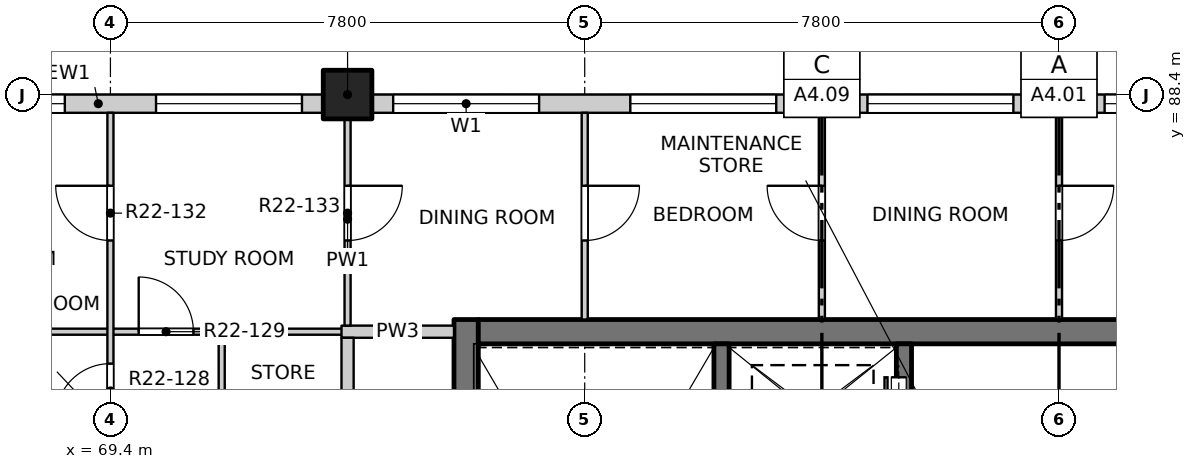
"""IFC4 building model, lengths in metres.
Left out: names, types, materials, properties, quantities, classifications, styles, units other than length and angle.
Written with IfcOpenShell. Run it as: python <this file> out.ifc"""

import sys

from ifc_helpers import new_model, si_unit, direction, frame, frame_2d, origin, origin_2d, place, context, subcontext, project, spatial, rectangle, extrude, element, fill, save


model = new_model("IFC4")
c1 = context("Model", 3, precision=1e-05, world=origin(), true_north=direction((0.0, 1.0)))
c2 = subcontext(c1, "Body", "Model", "MODEL_VIEW")
j1 = project(units=[si_unit("LENGTHUNIT", "METRE"), si_unit("PLANEANGLEUNIT", "RADIAN")], contexts=[c1])
p1 = place(None, origin())
s1 = spatial("IfcSite", under=j1, at=p1, CompositionType="ELEMENT")
p2 = place(p1, origin())
s2 = spatial("IfcBuilding", under=s1, at=p2, CompositionType="ELEMENT")
p3 = place(p2, frame((0.0, 0.0, 231.3)))
s3 = spatial("IfcBuildingStorey", under=s2, at=p3, CompositionType="ELEMENT", Elevation=231.3)
p4 = place(p3, frame((73.3, 88.4, -0.25), z_axis=(0.0, 0.0, 1.0), x_axis=(1.0, 0.0, 0.0)))
e1 = element("IfcColumn", 1, at=p4, inside=s3, PredefinedType="COLUMN", context=c2, shape_type="SweptSolid", body=[
    extrude(rectangle(XDim=0.8, YDim=0.8, at=origin_2d()), origin(), (0.0, 0.0, 1.0), 3.4),
])
p5 = place(p3, frame((75.25, 77.3, -0.25), z_axis=(0.0, 0.0, 1.0), x_axis=(0.0, 1.0, 0.0)))
e2 = element("IfcWall", 2, at=p5, inside=s3, PredefinedType="SOLIDWALL", context=c2, shape_type="SweptSolid", body=[
    extrude(rectangle(XDim=7.4, YDim=0.4, at=frame_2d((3.7, 0.0))), origin(), (0.0, 0.0, 1.0), 3.4),
])
p6 = place(p5, frame((0.3, 0.0, 0.25)))
e3 = element("IfcOpeningElement", 3, at=p6, cuts=e2, PredefinedType="OPENING", context=c2, shape_type="SweptSolid", body=[
    extrude(rectangle(XDim=1.2, YDim=2.1, at=frame_2d((0.6, 1.05))), frame((0.0, 0.21, 0.0), z_axis=(0.0, -1.0, 0.0), x_axis=(1.0, 0.0, 0.0)), (0.0, 0.0, 1.0), 0.42),
])
p7 = place(p3, frame((75.45, 84.5, -0.25), z_axis=(0.0, 0.0, 1.0), x_axis=(1.0, 0.0, 0.0)))
e4 = element("IfcWall", 4, at=p7, inside=s3, PredefinedType="SOLIDWALL", context=c2, shape_type="SweptSolid", body=[
    extrude(rectangle(XDim=19.1, YDim=0.4, at=frame_2d((9.55, 0.0))), origin(), (0.0, 0.0, 1.0), 3.4),
])
p8 = place(p3, frame((79.45, 77.3, -0.25), z_axis=(0.0, 0.0, 1.0), x_axis=(0.0, 1.0, 0.0)))
e5 = element("IfcWall", 5, at=p8, inside=s3, PredefinedType="SOLIDWALL", context=c2, shape_type="SweptSolid", body=[
    extrude(rectangle(XDim=7.0, YDim=0.25, at=frame_2d((3.5, 0.0))), origin(), (0.0, 0.0, 1.0), 3.4),
])
p9 = place(p3, frame((82.45, 82.025, -0.25), z_axis=(0.0, 0.0, 1.0), x_axis=(0.0, 1.0, 0.0)))
e6 = element("IfcWall", 6, at=p9, inside=s3, PredefinedType="SOLIDWALL", context=c2, shape_type="SweptSolid", body=[
    extrude(rectangle(XDim=2.275, YDim=0.25, at=frame_2d((1.138, 0.0))), origin(), (0.0, 0.0, 1.0), 3.4),
])
p10 = place(p9, frame((0.625, 0.0, 0.25)))
e7 = element("IfcOpeningElement", 7, at=p10, cuts=e6, PredefinedType="OPENING", context=c2, shape_type="SweptSolid", body=[
    extrude(rectangle(XDim=1.1, YDim=2.1, at=frame_2d((0.55, 1.05))), frame((0.0, 0.135, 0.0), z_axis=(0.0, -1.0, 0.0), x_axis=(1.0, 0.0, 0.0)), (0.0, 0.0, 1.0), 0.27),
])
p11 = place(p3, frame((65.5, 88.25, 0.0), z_axis=(0.0, 0.0, 1.0), x_axis=(1.0, 0.0, 0.0)))
e8 = element("IfcWall", 8, at=p11, inside=s3, PredefinedType="SOLIDWALL", context=c2, shape_type="SweptSolid", body=[
    extrude(rectangle(XDim=7.4, YDim=0.3, at=frame_2d((3.7, 0.0))), origin(), (0.0, 0.0, 1.0), 2.7),
])
p12 = place(p11, frame((0.75, 0.0, 0.9)))
e9 = element("IfcOpeningElement", 9, at=p12, cuts=e8, PredefinedType="OPENING", context=c2, shape_type="SweptSolid", body=[
    extrude(rectangle(XDim=2.4, YDim=1.8, at=frame_2d((1.2, 0.9))), frame((0.0, 0.16, 0.0), z_axis=(0.0, -1.0, 0.0), x_axis=(1.0, 0.0, 0.0)), (0.0, 0.0, 1.0), 0.32),
])
p13 = place(p11, frame((4.65, 0.0, 0.9)))
e10 = element("IfcOpeningElement", 10, at=p13, cuts=e8, PredefinedType="OPENING", context=c2, shape_type="SweptSolid", body=[
    extrude(rectangle(XDim=2.4, YDim=1.8, at=frame_2d((1.2, 0.9))), frame((0.0, 0.16, 0.0), z_axis=(0.0, -1.0, 0.0), x_axis=(1.0, 0.0, 0.0)), (0.0, 0.0, 1.0), 0.32),
])
p14 = place(p3, frame((73.7, 88.25, 0.0), z_axis=(0.0, 0.0, 1.0), x_axis=(1.0, 0.0, 0.0)))
e11 = element("IfcWall", 11, at=p14, inside=s3, PredefinedType="SOLIDWALL", context=c2, shape_type="SweptSolid", body=[
    extrude(rectangle(XDim=22.6, YDim=0.3, at=frame_2d((11.3, 0.0))), origin(), (0.0, 0.0, 1.0), 2.7),
])
p15 = place(p14, frame((0.35, 0.0, 0.9)))
e12 = element("IfcOpeningElement", 12, at=p15, cuts=e11, PredefinedType="OPENING", context=c2, shape_type="SweptSolid", body=[
    extrude(rectangle(XDim=2.4, YDim=1.8, at=frame_2d((1.2, 0.9))), frame((0.0, 0.16, 0.0), z_axis=(0.0, -1.0, 0.0), x_axis=(1.0, 0.0, 0.0)), (0.0, 0.0, 1.0), 0.32),
])
p16 = place(p14, frame((4.25, 0.0, 0.9)))
e13 = element("IfcOpeningElement", 13, at=p16, cuts=e11, PredefinedType="OPENING", context=c2, shape_type="SweptSolid", body=[
    extrude(rectangle(XDim=2.4, YDim=1.8, at=frame_2d((1.2, 0.9))), frame((0.0, 0.16, 0.0), z_axis=(0.0, -1.0, 0.0), x_axis=(1.0, 0.0, 0.0)), (0.0, 0.0, 1.0), 0.32),
])
p17 = place(p14, frame((8.15, 0.0, 0.9)))
e14 = element("IfcOpeningElement", 14, at=p17, cuts=e11, PredefinedType="OPENING", context=c2, shape_type="SweptSolid", body=[
    extrude(rectangle(XDim=2.4, YDim=1.8, at=frame_2d((1.2, 0.9))), frame((0.0, 0.16, 0.0), z_axis=(0.0, -1.0, 0.0), x_axis=(1.0, 0.0, 0.0)), (0.0, 0.0, 1.0), 0.32),
])
p18 = place(p14, frame((12.05, 0.0, 0.9)))
e15 = element("IfcOpeningElement", 15, at=p18, cuts=e11, PredefinedType="OPENING", context=c2, shape_type="SweptSolid", body=[
    extrude(rectangle(XDim=2.4, YDim=1.8, at=frame_2d((1.2, 0.9))), frame((0.0, 0.16, 0.0), z_axis=(0.0, -1.0, 0.0), x_axis=(1.0, 0.0, 0.0)), (0.0, 0.0, 1.0), 0.32),
])
p19 = place(p14, frame((15.95, 0.0, 0.9)))
e16 = element("IfcOpeningElement", 16, at=p19, cuts=e11, PredefinedType="OPENING", context=c2, shape_type="SweptSolid", body=[
    extrude(rectangle(XDim=2.4, YDim=1.8, at=frame_2d((1.2, 0.9))), frame((0.0, 0.16, 0.0), z_axis=(0.0, -1.0, 0.0), x_axis=(1.0, 0.0, 0.0)), (0.0, 0.0, 1.0), 0.32),
])
p20 = place(p14, frame((19.85, 0.0, 0.9)))
e17 = element("IfcOpeningElement", 17, at=p20, cuts=e11, PredefinedType="OPENING", context=c2, shape_type="SweptSolid", body=[
    extrude(rectangle(XDim=2.4, YDim=1.8, at=frame_2d((1.2, 0.9))), frame((0.0, 0.16, 0.0), z_axis=(0.0, -1.0, 0.0), x_axis=(1.0, 0.0, 0.0)), (0.0, 0.0, 1.0), 0.32),
])
p21 = place(p3, frame((61.9, 84.5, 0.0), z_axis=(0.0, 0.0, 1.0), x_axis=(1.0, 0.0, 0.0)))
e18 = element("IfcWall", 18, at=p21, inside=s3, PredefinedType="PARTITIONING", context=c2, shape_type="SweptSolid", body=[
    extrude(rectangle(XDim=11.5, YDim=0.1, at=frame_2d((5.75, 0.0))), origin(), (0.0, 0.0, 1.0), 3.15),
])
p22 = place(p21, frame((7.965, 0.0, 0.0)))
e19 = element("IfcOpeningElement", 19, at=p22, cuts=e18, PredefinedType="OPENING", context=c2, shape_type="SweptSolid", body=[
    extrude(rectangle(XDim=0.9, YDim=2.1, at=frame_2d((0.45, 1.05))), frame((0.0, 0.06, 0.0), z_axis=(0.0, -1.0, 0.0), x_axis=(1.0, 0.0, 0.0)), (0.0, 0.0, 1.0), 0.12),
])
p23 = place(p3, frame((73.2, 84.5, 0.0), z_axis=(0.0, 0.0, 1.0), x_axis=(1.0, 0.0, 0.0)))
e20 = element("IfcWall", 20, at=p23, inside=s3, PredefinedType="PARTITIONING", context=c2, shape_type="SweptSolid", body=[
    extrude(rectangle(XDim=1.85, YDim=0.2, at=frame_2d((0.925, 0.0))), origin(), (0.0, 0.0, 1.0), 3.15),
])
p24 = place(p3, frame((69.4, 41.9, 0.0), z_axis=(0.0, 0.0, 1.0), x_axis=(0.0, 1.0, 0.0)))
e21 = element("IfcWall", 21, at=p24, inside=s3, PredefinedType="PARTITIONING", context=c2, shape_type="SweptSolid", body=[
    extrude(rectangle(XDim=46.2, YDim=0.1, at=frame_2d((23.1, 0.0))), origin(), (0.0, 0.0, 1.0), 3.15),
])
p25 = place(p24, frame((1.2, 0.0, 0.0)))
e22 = element("IfcOpeningElement", 22, at=p25, cuts=e21, PredefinedType="OPENING", context=c2, shape_type="SweptSolid", body=[
    extrude(rectangle(XDim=0.9, YDim=2.1, at=frame_2d((0.45, 1.05))), frame((0.0, 0.06, 0.0), z_axis=(0.0, -1.0, 0.0), x_axis=(1.0, 0.0, 0.0)), (0.0, 0.0, 1.0), 0.12),
])
p26 = place(p24, frame((5.1, 0.0, 0.0)))
e23 = element("IfcOpeningElement", 23, at=p26, cuts=e21, PredefinedType="OPENING", context=c2, shape_type="SweptSolid", body=[
    extrude(rectangle(XDim=0.9, YDim=2.1, at=frame_2d((0.45, 1.05))), frame((0.0, 0.06, 0.0), z_axis=(0.0, -1.0, 0.0), x_axis=(1.0, 0.0, 0.0)), (0.0, 0.0, 1.0), 0.12),
])
p27 = place(p24, frame((9.0, 0.0, 0.0)))
e24 = element("IfcOpeningElement", 24, at=p27, cuts=e21, PredefinedType="OPENING", context=c2, shape_type="SweptSolid", body=[
    extrude(rectangle(XDim=0.9, YDim=2.1, at=frame_2d((0.45, 1.05))), frame((0.0, 0.06, 0.0), z_axis=(0.0, -1.0, 0.0), x_axis=(1.0, 0.0, 0.0)), (0.0, 0.0, 1.0), 0.12),
])
p28 = place(p24, frame((13.85, 0.0, 0.0)))
e25 = element("IfcOpeningElement", 25, at=p28, cuts=e21, PredefinedType="OPENING", context=c2, shape_type="SweptSolid", body=[
    extrude(rectangle(XDim=0.9, YDim=2.1, at=frame_2d((0.45, 1.05))), frame((0.0, 0.06, 0.0), z_axis=(0.0, -1.0, 0.0), x_axis=(1.0, 0.0, 0.0)), (0.0, 0.0, 1.0), 0.12),
])
p29 = place(p24, frame((17.775, 0.0, 0.0)))
e26 = element("IfcOpeningElement", 26, at=p29, cuts=e21, PredefinedType="OPENING", context=c2, shape_type="SweptSolid", body=[
    extrude(rectangle(XDim=0.9, YDim=2.1, at=frame_2d((0.45, 1.05))), frame((0.0, 0.06, 0.0), z_axis=(0.0, -1.0, 0.0), x_axis=(1.0, 0.0, 0.0)), (0.0, 0.0, 1.0), 0.12),
])
p30 = place(p24, frame((21.625, 0.0, 0.0)))
e27 = element("IfcOpeningElement", 27, at=p30, cuts=e21, PredefinedType="OPENING", context=c2, shape_type="SweptSolid", body=[
    extrude(rectangle(XDim=0.9, YDim=2.1, at=frame_2d((0.45, 1.05))), frame((0.0, 0.06, 0.0), z_axis=(0.0, -1.0, 0.0), x_axis=(1.0, 0.0, 0.0)), (0.0, 0.0, 1.0), 0.12),
])
p31 = place(p24, frame((24.6, 0.0, 0.0)))
e28 = element("IfcOpeningElement", 28, at=p31, cuts=e21, PredefinedType="OPENING", context=c2, shape_type="SweptSolid", body=[
    extrude(rectangle(XDim=0.9, YDim=2.1, at=frame_2d((0.45, 1.05))), frame((0.0, 0.06, 0.0), z_axis=(0.0, -1.0, 0.0), x_axis=(1.0, 0.0, 0.0)), (0.0, 0.0, 1.0), 0.12),
])
p32 = place(p24, frame((29.425, 0.0, 0.0)))
e29 = element("IfcOpeningElement", 29, at=p32, cuts=e21, PredefinedType="OPENING", context=c2, shape_type="SweptSolid", body=[
    extrude(rectangle(XDim=0.9, YDim=2.1, at=frame_2d((0.45, 1.05))), frame((0.0, 0.06, 0.0), z_axis=(0.0, -1.0, 0.0), x_axis=(1.0, 0.0, 0.0)), (0.0, 0.0, 1.0), 0.12),
])
p33 = place(p24, frame((33.375, 0.0, 0.0)))
e30 = element("IfcOpeningElement", 30, at=p33, cuts=e21, PredefinedType="OPENING", context=c2, shape_type="SweptSolid", body=[
    extrude(rectangle(XDim=0.9, YDim=2.1, at=frame_2d((0.45, 1.05))), frame((0.0, 0.06, 0.0), z_axis=(0.0, -1.0, 0.0), x_axis=(1.0, 0.0, 0.0)), (0.0, 0.0, 1.0), 0.12),
])
p34 = place(p24, frame((36.3, 0.0, 0.0)))
e31 = element("IfcOpeningElement", 31, at=p34, cuts=e21, PredefinedType="OPENING", context=c2, shape_type="SweptSolid", body=[
    extrude(rectangle(XDim=0.9, YDim=2.1, at=frame_2d((0.45, 1.05))), frame((0.0, 0.06, 0.0), z_axis=(0.0, -1.0, 0.0), x_axis=(1.0, 0.0, 0.0)), (0.0, 0.0, 1.0), 0.12),
])
p35 = place(p24, frame((41.175, 0.0, 0.0)))
e32 = element("IfcOpeningElement", 32, at=p35, cuts=e21, PredefinedType="OPENING", context=c2, shape_type="SweptSolid", body=[
    extrude(rectangle(XDim=0.9, YDim=2.1, at=frame_2d((0.45, 1.05))), frame((0.0, 0.06, 0.0), z_axis=(0.0, -1.0, 0.0), x_axis=(1.0, 0.0, 0.0)), (0.0, 0.0, 1.0), 0.12),
])
p36 = place(p24, frame((44.1, 0.0, 0.0)))
e33 = element("IfcOpeningElement", 33, at=p36, cuts=e21, PredefinedType="OPENING", context=c2, shape_type="SweptSolid", body=[
    extrude(rectangle(XDim=0.9, YDim=2.1, at=frame_2d((0.45, 1.05))), frame((0.0, 0.06, 0.0), z_axis=(0.0, -1.0, 0.0), x_axis=(1.0, 0.0, 0.0)), (0.0, 0.0, 1.0), 0.12),
])
p37 = place(p3, frame((71.23, 75.55, 0.0), z_axis=(0.0, 0.0, 1.0), x_axis=(0.0, 1.0, 0.0)))
e34 = element("IfcWall", 34, at=p37, inside=s3, PredefinedType="PARTITIONING", context=c2, shape_type="SweptSolid", body=[
    extrude(rectangle(XDim=8.9, YDim=0.1, at=frame_2d((4.45, 0.0))), origin(), (0.0, 0.0, 1.0), 3.15),
])
p38 = place(p37, frame((0.7, 0.0, 0.0)))
e35 = element("IfcOpeningElement", 35, at=p38, cuts=e34, PredefinedType="OPENING", context=c2, shape_type="SweptSolid", body=[
    extrude(rectangle(XDim=0.9, YDim=2.1, at=frame_2d((0.45, 1.05))), frame((0.0, 0.06, 0.0), z_axis=(0.0, -1.0, 0.0), x_axis=(1.0, 0.0, 0.0)), (0.0, 0.0, 1.0), 0.12),
])
p39 = place(p37, frame((3.75, 0.0, 0.0)))
e36 = element("IfcOpeningElement", 36, at=p39, cuts=e34, PredefinedType="OPENING", context=c2, shape_type="SweptSolid", body=[
    extrude(rectangle(XDim=0.9, YDim=2.1, at=frame_2d((0.45, 1.05))), frame((0.0, 0.06, 0.0), z_axis=(0.0, -1.0, 0.0), x_axis=(1.0, 0.0, 0.0)), (0.0, 0.0, 1.0), 0.12),
])
p40 = place(p37, frame((7.1, 0.0, 0.0)))
e37 = element("IfcOpeningElement", 37, at=p40, cuts=e34, PredefinedType="OPENING", context=c2, shape_type="SweptSolid", body=[
    extrude(rectangle(XDim=0.8, YDim=2.1, at=frame_2d((0.4, 1.05))), frame((0.0, 0.06, 0.0), z_axis=(0.0, -1.0, 0.0), x_axis=(1.0, 0.0, 0.0)), (0.0, 0.0, 1.0), 0.12),
])
p41 = place(p3, frame((73.3, 49.5, 0.0), z_axis=(0.0, 0.0, 1.0), x_axis=(0.0, 1.0, 0.0)))
e38 = element("IfcWall", 38, at=p41, inside=s3, PredefinedType="PARTITIONING", context=c2, shape_type="SweptSolid", body=[
    extrude(rectangle(XDim=34.9, YDim=0.2, at=frame_2d((17.45, 0.0))), origin(), (0.0, 0.0, 1.0), 3.15),
])
p42 = place(p41, frame((3.575, 0.0, 0.0)))
e39 = element("IfcOpeningElement", 39, at=p42, cuts=e38, PredefinedType="OPENING", context=c2, shape_type="SweptSolid", body=[
    extrude(rectangle(XDim=1.0, YDim=2.1, at=frame_2d((0.5, 1.05))), frame((0.0, 0.11, 0.0), z_axis=(0.0, -1.0, 0.0), x_axis=(1.0, 0.0, 0.0)), (0.0, 0.0, 1.0), 0.22),
])
p43 = place(p41, frame((18.075, 0.0, 0.0)))
e40 = element("IfcOpeningElement", 40, at=p43, cuts=e38, PredefinedType="OPENING", context=c2, shape_type="SweptSolid", body=[
    extrude(rectangle(XDim=1.0, YDim=2.1, at=frame_2d((0.5, 1.05))), frame((0.0, 0.11, 0.0), z_axis=(0.0, -1.0, 0.0), x_axis=(1.0, 0.0, 0.0)), (0.0, 0.0, 1.0), 0.22),
])
p44 = place(p41, frame((26.175, 0.0, 0.0)))
e41 = element("IfcOpeningElement", 41, at=p44, cuts=e38, PredefinedType="OPENING", context=c2, shape_type="SweptSolid", body=[
    extrude(rectangle(XDim=1.0, YDim=2.1, at=frame_2d((0.5, 1.05))), frame((0.0, 0.11, 0.0), z_axis=(0.0, -1.0, 0.0), x_axis=(1.0, 0.0, 0.0)), (0.0, 0.0, 1.0), 0.22),
])
p45 = place(p3, frame((73.3, 84.6, 0.0), z_axis=(0.0, 0.0, 1.0), x_axis=(0.0, 1.0, 0.0)))
e42 = element("IfcWall", 42, at=p45, inside=s3, PredefinedType="PARTITIONING", context=c2, shape_type="SweptSolid", body=[
    extrude(rectangle(XDim=3.5, YDim=0.1, at=frame_2d((1.75, 0.0))), origin(), (0.0, 0.0, 1.0), 3.15),
])
p46 = place(p45, frame((1.4, 0.0, 0.0)))
e43 = element("IfcOpeningElement", 43, at=p46, cuts=e42, PredefinedType="OPENING", context=c2, shape_type="SweptSolid", body=[
    extrude(rectangle(XDim=0.9, YDim=2.1, at=frame_2d((0.45, 1.05))), frame((0.0, 0.06, 0.0), z_axis=(0.0, -1.0, 0.0), x_axis=(1.0, 0.0, 0.0)), (0.0, 0.0, 1.0), 0.12),
])
p47 = place(p3, frame((77.2, 84.7, 0.0), z_axis=(0.0, 0.0, 1.0), x_axis=(0.0, 1.0, 0.0)))
e44 = element("IfcWall", 44, at=p47, inside=s3, PredefinedType="PARTITIONING", context=c2, shape_type="SweptSolid", body=[
    extrude(rectangle(XDim=3.4, YDim=0.1, at=frame_2d((1.7, 0.0))), origin(), (0.0, 0.0, 1.0), 3.15),
])
p48 = place(p47, frame((1.3, 0.0, 0.0)))
e45 = element("IfcOpeningElement", 45, at=p48, cuts=e44, PredefinedType="OPENING", context=c2, shape_type="SweptSolid", body=[
    extrude(rectangle(XDim=0.9, YDim=2.1, at=frame_2d((0.45, 1.05))), frame((0.0, 0.06, 0.0), z_axis=(0.0, -1.0, 0.0), x_axis=(1.0, 0.0, 0.0)), (0.0, 0.0, 1.0), 0.12),
])
p49 = place(p3, frame((81.1, 84.7, 0.0), z_axis=(0.0, 0.0, 1.0), x_axis=(0.0, 1.0, 0.0)))
e46 = element("IfcWall", 46, at=p49, inside=s3, PredefinedType="PARTITIONING", context=c2, shape_type="SweptSolid", body=[
    extrude(rectangle(XDim=3.4, YDim=0.1, at=frame_2d((1.7, 0.0))), origin(), (0.0, 0.0, 1.0), 3.15),
])
p50 = place(p49, frame((1.3, 0.0, 0.0)))
e47 = element("IfcOpeningElement", 47, at=p50, cuts=e46, PredefinedType="OPENING", context=c2, shape_type="SweptSolid", body=[
    extrude(rectangle(XDim=0.9, YDim=2.1, at=frame_2d((0.45, 1.05))), frame((0.0, 0.06, 0.0), z_axis=(0.0, -1.0, 0.0), x_axis=(1.0, 0.0, 0.0)), (0.0, 0.0, 1.0), 0.12),
])
p51 = place(p3, frame((85.0, 84.7, 0.0), z_axis=(0.0, 0.0, 1.0), x_axis=(0.0, 1.0, 0.0)))
e48 = element("IfcWall", 48, at=p51, inside=s3, PredefinedType="PARTITIONING", context=c2, shape_type="SweptSolid", body=[
    extrude(rectangle(XDim=3.4, YDim=0.1, at=frame_2d((1.7, 0.0))), origin(), (0.0, 0.0, 1.0), 3.15),
])
p52 = place(p51, frame((1.3, 0.0, 0.0)))
e49 = element("IfcOpeningElement", 49, at=p52, cuts=e48, PredefinedType="OPENING", context=c2, shape_type="SweptSolid", body=[
    extrude(rectangle(XDim=0.9, YDim=2.1, at=frame_2d((0.45, 1.05))), frame((0.0, 0.06, 0.0), z_axis=(0.0, -1.0, 0.0), x_axis=(1.0, 0.0, 0.0)), (0.0, 0.0, 1.0), 0.12),
])
p53 = place(p12, origin())
e50 = element("IfcWindow", 50, at=p53, inside=s3, PartitioningType="DOUBLE_PANEL_VERTICAL", PredefinedType="WINDOW", context=c2, shape_type="SweptSolid", body=[
    extrude(rectangle(XDim=2.4, YDim=1.8, at=frame_2d((1.2, 0.9))), frame((0.0, 0.03, 0.0), z_axis=(0.0, -1.0, 0.0), x_axis=(1.0, 0.0, 0.0)), (0.0, 0.0, 1.0), 0.06),
])
fill(e9, e50)
p54 = place(p13, origin())
e51 = element("IfcWindow", 51, at=p54, inside=s3, PartitioningType="DOUBLE_PANEL_VERTICAL", PredefinedType="WINDOW", context=c2, shape_type="SweptSolid", body=[
    extrude(rectangle(XDim=2.4, YDim=1.8, at=frame_2d((1.2, 0.9))), frame((0.0, 0.03, 0.0), z_axis=(0.0, -1.0, 0.0), x_axis=(1.0, 0.0, 0.0)), (0.0, 0.0, 1.0), 0.06),
])
fill(e10, e51)
p55 = place(p15, origin())
e52 = element("IfcWindow", 52, at=p55, inside=s3, PartitioningType="DOUBLE_PANEL_VERTICAL", PredefinedType="WINDOW", context=c2, shape_type="SweptSolid", body=[
    extrude(rectangle(XDim=2.4, YDim=1.8, at=frame_2d((1.2, 0.9))), frame((0.0, 0.03, 0.0), z_axis=(0.0, -1.0, 0.0), x_axis=(1.0, 0.0, 0.0)), (0.0, 0.0, 1.0), 0.06),
])
fill(e12, e52)
p56 = place(p16, origin())
e53 = element("IfcWindow", 53, at=p56, inside=s3, PartitioningType="DOUBLE_PANEL_VERTICAL", PredefinedType="WINDOW", context=c2, shape_type="SweptSolid", body=[
    extrude(rectangle(XDim=2.4, YDim=1.8, at=frame_2d((1.2, 0.9))), frame((0.0, 0.03, 0.0), z_axis=(0.0, -1.0, 0.0), x_axis=(1.0, 0.0, 0.0)), (0.0, 0.0, 1.0), 0.06),
])
fill(e13, e53)
p57 = place(p17, origin())
e54 = element("IfcWindow", 54, at=p57, inside=s3, PartitioningType="DOUBLE_PANEL_VERTICAL", PredefinedType="WINDOW", context=c2, shape_type="SweptSolid", body=[
    extrude(rectangle(XDim=2.4, YDim=1.8, at=frame_2d((1.2, 0.9))), frame((0.0, 0.03, 0.0), z_axis=(0.0, -1.0, 0.0), x_axis=(1.0, 0.0, 0.0)), (0.0, 0.0, 1.0), 0.06),
])
fill(e14, e54)
p58 = place(p18, origin())
e55 = element("IfcWindow", 55, at=p58, inside=s3, PartitioningType="DOUBLE_PANEL_VERTICAL", PredefinedType="WINDOW", context=c2, shape_type="SweptSolid", body=[
    extrude(rectangle(XDim=2.4, YDim=1.8, at=frame_2d((1.2, 0.9))), frame((0.0, 0.03, 0.0), z_axis=(0.0, -1.0, 0.0), x_axis=(1.0, 0.0, 0.0)), (0.0, 0.0, 1.0), 0.06),
])
fill(e15, e55)
p59 = place(p10, origin())
e56 = element("IfcDoor", 56, at=p59, inside=s3, OperationType="SLIDING_TO_RIGHT", PredefinedType="DOOR", context=c2, shape_type="SweptSolid", body=[
    extrude(rectangle(XDim=1.1, YDim=2.1, at=frame_2d((0.55, 1.05))), frame((0.0, 0.11, 0.0), z_axis=(0.0, -1.0, 0.0), x_axis=(1.0, 0.0, 0.0)), (0.0, 0.0, 1.0), 0.05),
])
fill(e7, e56)
p60 = place(p35, origin())
e57 = element("IfcDoor", 57, at=p60, inside=s3, OperationType="SINGLE_SWING_LEFT", PredefinedType="DOOR", context=c2, shape_type="SweptSolid", body=[
    extrude(rectangle(XDim=0.9, YDim=2.1, at=frame_2d((0.45, 1.05))), frame((0.0, 0.025, 0.0), z_axis=(0.0, -1.0, 0.0), x_axis=(1.0, 0.0, 0.0)), (0.0, 0.0, 1.0), 0.05),
])
fill(e32, e57)
p61 = place(p22, origin())
e58 = element("IfcDoor", 58, at=p61, inside=s3, OperationType="SINGLE_SWING_LEFT", PredefinedType="DOOR", context=c2, shape_type="SweptSolid", body=[
    extrude(rectangle(XDim=0.9, YDim=2.1, at=frame_2d((0.45, 1.05))), frame((0.0, 0.025, 0.0), z_axis=(0.0, -1.0, 0.0), x_axis=(1.0, 0.0, 0.0)), (0.0, 0.0, 1.0), 0.05),
])
fill(e19, e58)
p62 = place(p36, origin())
e59 = element("IfcDoor", 59, at=p62, inside=s3, OperationType="SINGLE_SWING_RIGHT", PredefinedType="DOOR", context=c2, shape_type="SweptSolid", body=[
    extrude(rectangle(XDim=0.9, YDim=2.1, at=frame_2d((0.45, 1.05))), frame((0.0, 0.025, 0.0), z_axis=(0.0, -1.0, 0.0), x_axis=(1.0, 0.0, 0.0)), (0.0, 0.0, 1.0), 0.05),
])
fill(e33, e59)
p63 = place(p46, origin())
e60 = element("IfcDoor", 60, at=p63, inside=s3, OperationType="SINGLE_SWING_LEFT", PredefinedType="DOOR", context=c2, shape_type="SweptSolid", body=[
    extrude(rectangle(XDim=0.9, YDim=2.1, at=frame_2d((0.45, 1.05))), frame((0.0, 0.025, 0.0), z_axis=(0.0, -1.0, 0.0), x_axis=(1.0, 0.0, 0.0)), (0.0, 0.0, 1.0), 0.05),
])
fill(e43, e60)
p64 = place(p48, origin())
e61 = element("IfcDoor", 61, at=p64, inside=s3, OperationType="SINGLE_SWING_LEFT", PredefinedType="DOOR", context=c2, shape_type="SweptSolid", body=[
    extrude(rectangle(XDim=0.9, YDim=2.1, at=frame_2d((0.45, 1.05))), frame((0.0, 0.025, 0.0), z_axis=(0.0, -1.0, 0.0), x_axis=(1.0, 0.0, 0.0)), (0.0, 0.0, 1.0), 0.05),
])
fill(e45, e61)
p65 = place(p50, origin())
e62 = element("IfcDoor", 62, at=p65, inside=s3, OperationType="SINGLE_SWING_RIGHT", PredefinedType="DOOR", context=c2, shape_type="SweptSolid", body=[
    extrude(rectangle(XDim=0.9, YDim=2.1, at=frame_2d((0.45, 1.05))), frame((0.0, 0.025, 0.0), z_axis=(0.0, -1.0, 0.0), x_axis=(1.0, 0.0, 0.0)), (0.0, 0.0, 1.0), 0.05),
])
fill(e47, e62)
p66 = place(p52, origin())
e63 = element("IfcDoor", 63, at=p66, inside=s3, OperationType="SINGLE_SWING_LEFT", PredefinedType="DOOR", context=c2, shape_type="SweptSolid", body=[
    extrude(rectangle(XDim=0.9, YDim=2.1, at=frame_2d((0.45, 1.05))), frame((0.0, 0.025, 0.0), z_axis=(0.0, -1.0, 0.0), x_axis=(1.0, 0.0, 0.0)), (0.0, 0.0, 1.0), 0.05),
])
fill(e49, e63)
save(model, sys.argv[1])
